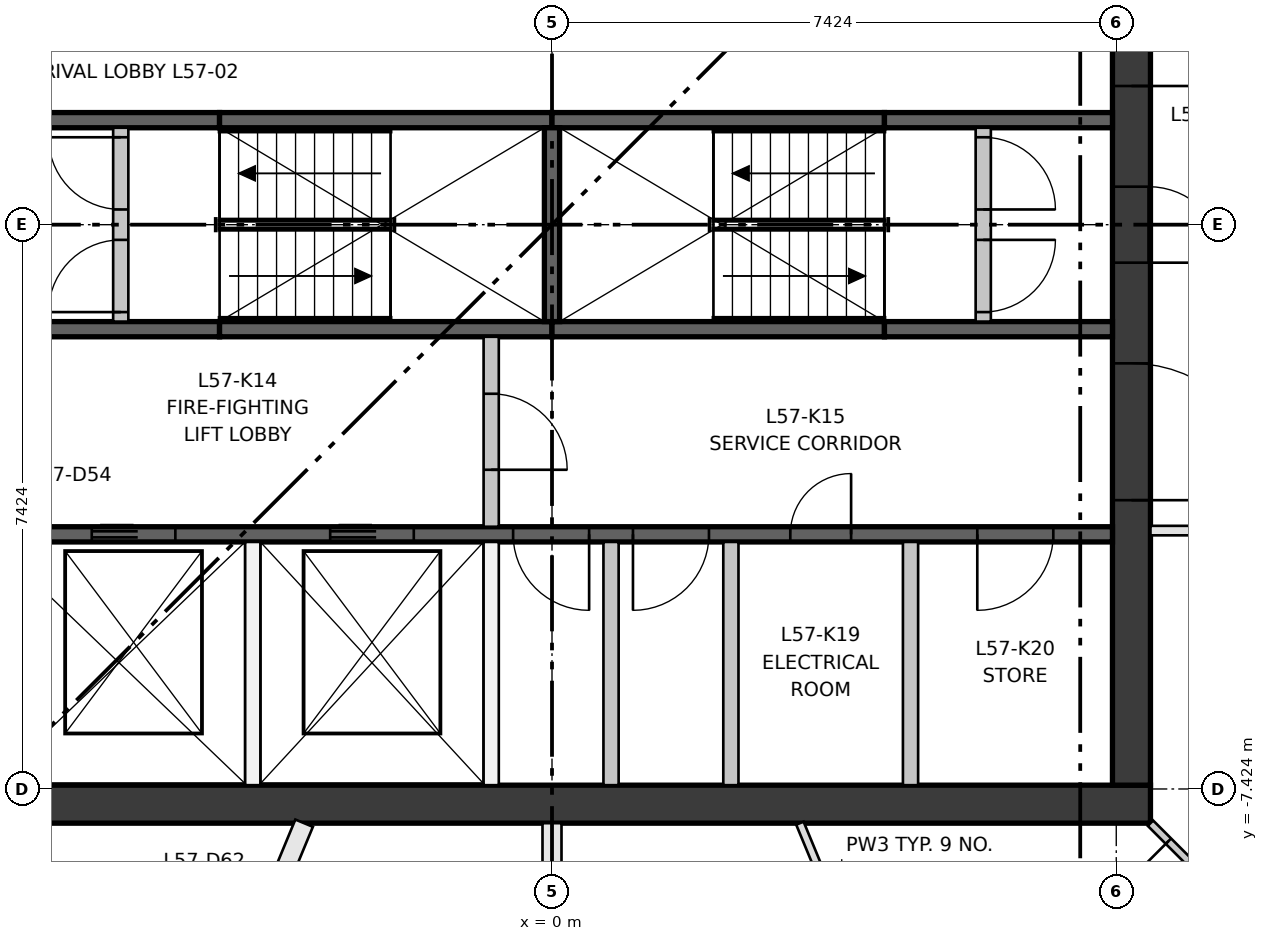
"""IFC4 building model, lengths in metres.
Left out: names, types, materials, properties, quantities, classifications, styles, units other than length and angle.
Written with IfcOpenShell. Run it as: python <this file> out.ifc"""

import sys

from ifc_helpers import new_model, si_unit, direction, frame, frame_2d, origin, place, context, subcontext, project, spatial, rectangle, extrude, element, fill, save


model = new_model("IFC4")
c1 = context("Model", 3, precision=1e-05, world=origin(), true_north=direction((0.0, 1.0)))
c2 = subcontext(c1, "Body", "Model", "MODEL_VIEW")
j1 = project(units=[si_unit("LENGTHUNIT", "METRE"), si_unit("PLANEANGLEUNIT", "RADIAN")], contexts=[c1])
p1 = place(None, origin())
s1 = spatial("IfcSite", under=j1, at=p1, CompositionType="ELEMENT")
p2 = place(p1, origin())
s2 = spatial("IfcBuilding", under=s1, at=p2, CompositionType="ELEMENT")
p3 = place(p2, frame((0.0, 0.0, 211.1)))
s3 = spatial("IfcBuildingStorey", under=s2, at=p3, CompositionType="ELEMENT", Elevation=211.1)
p4 = place(p3, frame((-7.874, -7.624, 0.0), z_axis=(0.0, 0.0, 1.0), x_axis=(1.0, 0.0, 0.0)))
e1 = element("IfcWall", 1, at=p4, inside=s3, PredefinedType="SHEAR", context=c2, shape_type="SweptSolid", body=[
    extrude(rectangle(XDim=15.748, YDim=0.5, at=frame_2d((7.874, 0.0))), origin(), (0.0, 0.0, 1.0), 3.35),
])
p5 = place(p3, frame((7.624, -7.374, 0.0), z_axis=(0.0, 0.0, 1.0), x_axis=(0.0, 1.0, 0.0)))
e2 = element("IfcWall", 2, at=p5, inside=s3, PredefinedType="SHEAR", context=c2, shape_type="SweptSolid", body=[
    extrude(rectangle(XDim=14.748, YDim=0.5, at=frame_2d((7.374, 0.0))), origin(), (0.0, 0.0, 1.0), 3.35),
])
p6 = place(p5, frame((6.874, 0.0, 0.0)))
e3 = element("IfcOpeningElement", 3, at=p6, cuts=e2, PredefinedType="OPENING", context=c2, shape_type="SweptSolid", body=[
    extrude(rectangle(XDim=1.0, YDim=2.1, at=frame_2d((0.5, 1.05))), frame((0.0, 0.26, 0.0), z_axis=(0.0, -1.0, 0.0), x_axis=(1.0, 0.0, 0.0)), (0.0, 0.0, 1.0), 0.52),
])
p7 = place(p5, frame((3.75, 0.0, 0.0)))
e4 = element("IfcOpeningElement", 4, at=p7, cuts=e2, PredefinedType="OPENING", context=c2, shape_type="SweptSolid", body=[
    extrude(rectangle(XDim=1.8, YDim=2.1, at=frame_2d((0.9, 1.05))), frame((0.0, 0.26, 0.0), z_axis=(0.0, -1.0, 0.0), x_axis=(1.0, 0.0, 0.0)), (0.0, 0.0, 1.0), 0.52),
])
p8 = place(p5, frame((9.198, 0.0, 0.0)))
e5 = element("IfcOpeningElement", 5, at=p8, cuts=e2, PredefinedType="OPENING", context=c2, shape_type="SweptSolid", body=[
    extrude(rectangle(XDim=1.8, YDim=2.1, at=frame_2d((0.9, 1.05))), frame((0.0, 0.26, 0.0), z_axis=(0.0, -1.0, 0.0), x_axis=(1.0, 0.0, 0.0)), (0.0, 0.0, 1.0), 0.52),
])
p9 = place(p3, frame((-7.374, -4.074, 0.0), z_axis=(0.0, 0.0, 1.0), x_axis=(1.0, 0.0, 0.0)))
e6 = element("IfcWall", 6, at=p9, inside=s3, PredefinedType="SHEAR", context=c2, shape_type="SweptSolid", body=[
    extrude(rectangle(XDim=14.748, YDim=0.2, at=frame_2d((7.374, 0.0))), origin(), (0.0, 0.0, 1.0), 3.0),
])
p10 = place(p9, frame((1.319, 0.0, 0.0)))
e7 = element("IfcOpeningElement", 7, at=p10, cuts=e6, PredefinedType="OPENING", context=c2, shape_type="SweptSolid", body=[
    extrude(rectangle(XDim=1.1, YDim=2.1, at=frame_2d((0.55, 1.05))), frame((0.0, 0.11, 0.0), z_axis=(0.0, -1.0, 0.0), x_axis=(1.0, 0.0, 0.0)), (0.0, 0.0, 1.0), 0.22),
])
p11 = place(p9, frame((4.456, 0.0, 0.0)))
e8 = element("IfcOpeningElement", 8, at=p11, cuts=e6, PredefinedType="OPENING", context=c2, shape_type="SweptSolid", body=[
    extrude(rectangle(XDim=1.1, YDim=2.1, at=frame_2d((0.55, 1.05))), frame((0.0, 0.11, 0.0), z_axis=(0.0, -1.0, 0.0), x_axis=(1.0, 0.0, 0.0)), (0.0, 0.0, 1.0), 0.22),
])
p12 = place(p9, frame((6.862, 0.0, 0.0)))
e9 = element("IfcOpeningElement", 9, at=p12, cuts=e6, PredefinedType="OPENING", context=c2, shape_type="SweptSolid", body=[
    extrude(rectangle(XDim=1.0, YDim=2.1, at=frame_2d((0.5, 1.05))), frame((0.0, 0.11, 0.0), z_axis=(0.0, -1.0, 0.0), x_axis=(1.0, 0.0, 0.0)), (0.0, 0.0, 1.0), 0.22),
])
p13 = place(p9, frame((8.439, 0.0, 0.0)))
e10 = element("IfcOpeningElement", 10, at=p13, cuts=e6, PredefinedType="OPENING", context=c2, shape_type="SweptSolid", body=[
    extrude(rectangle(XDim=1.0, YDim=2.1, at=frame_2d((0.5, 1.05))), frame((0.0, 0.11, 0.0), z_axis=(0.0, -1.0, 0.0), x_axis=(1.0, 0.0, 0.0)), (0.0, 0.0, 1.0), 0.22),
])
p14 = place(p9, frame((10.509, 0.0, 0.0)))
e11 = element("IfcOpeningElement", 11, at=p14, cuts=e6, PredefinedType="OPENING", context=c2, shape_type="SweptSolid", body=[
    extrude(rectangle(XDim=0.8, YDim=2.1, at=frame_2d((0.4, 1.05))), frame((0.0, 0.11, 0.0), z_axis=(0.0, -1.0, 0.0), x_axis=(1.0, 0.0, 0.0)), (0.0, 0.0, 1.0), 0.22),
])
p15 = place(p9, frame((12.969, 0.0, 0.0)))
e12 = element("IfcOpeningElement", 12, at=p15, cuts=e6, PredefinedType="OPENING", context=c2, shape_type="SweptSolid", body=[
    extrude(rectangle(XDim=1.0, YDim=2.1, at=frame_2d((0.5, 1.05))), frame((0.0, 0.11, 0.0), z_axis=(0.0, -1.0, 0.0), x_axis=(1.0, 0.0, 0.0)), (0.0, 0.0, 1.0), 0.22),
])
p16 = place(p3, frame((-7.374, -1.375, 0.0), z_axis=(0.0, 0.0, 1.0), x_axis=(1.0, 0.0, 0.0)))
e13 = element("IfcWall", 13, at=p16, inside=s3, PredefinedType="SHEAR", context=c2, shape_type="SweptSolid", body=[
    extrude(rectangle(XDim=3.0, YDim=0.2, at=frame_2d((1.5, 0.0))), origin(), (0.0, 0.0, 1.0), 3.0),
])
for number, where, z_axis, x_axis in (
    (14, (-4.374, -1.375, 0.0), (0.0, 0.0, 1.0), (1.0, 0.0, 0.0)),
    (15, (0.0, -1.375, 0.0), (0.0, 0.0, 1.0), (1.0, 0.0, 0.0)),
):
    element("IfcWall", number, at=place(p3, frame(where, z_axis=z_axis, x_axis=x_axis)), inside=s3, PredefinedType="SHEAR", context=c2, shape_type="SweptSolid", body=[
        extrude(rectangle(XDim=4.374, YDim=0.2, at=frame_2d((2.187, 0.0))), origin(), (0.0, 0.0, 1.0), 3.0),
    ])
for number, where, z_axis, x_axis in (
    (16, (4.374, -1.375, 0.0), (0.0, 0.0, 1.0), (1.0, 0.0, 0.0)),
    (17, (-7.374, 1.375, 0.0), (0.0, 0.0, 1.0), (1.0, 0.0, 0.0)),
):
    element("IfcWall", number, at=place(p3, frame(where, z_axis=z_axis, x_axis=x_axis)), inside=s3, PredefinedType="SHEAR", context=c2, shape_type="SweptSolid", body=[
        extrude(rectangle(XDim=3.0, YDim=0.2, at=frame_2d((1.5, 0.0))), origin(), (0.0, 0.0, 1.0), 3.0),
    ])
for number, where, z_axis, x_axis in (
    (18, (-4.374, 1.375, 0.0), (0.0, 0.0, 1.0), (1.0, 0.0, 0.0)),
    (19, (0.0, 1.375, 0.0), (0.0, 0.0, 1.0), (1.0, 0.0, 0.0)),
):
    element("IfcWall", number, at=place(p3, frame(where, z_axis=z_axis, x_axis=x_axis)), inside=s3, PredefinedType="SHEAR", context=c2, shape_type="SweptSolid", body=[
        extrude(rectangle(XDim=4.374, YDim=0.2, at=frame_2d((2.187, 0.0))), origin(), (0.0, 0.0, 1.0), 3.0),
    ])
p17 = place(p3, frame((4.374, 1.375, 0.0), z_axis=(0.0, 0.0, 1.0), x_axis=(1.0, 0.0, 0.0)))
e20 = element("IfcWall", 20, at=p17, inside=s3, PredefinedType="SHEAR", context=c2, shape_type="SweptSolid", body=[
    extrude(rectangle(XDim=3.0, YDim=0.2, at=frame_2d((1.5, 0.0))), origin(), (0.0, 0.0, 1.0), 3.0),
])
p18 = place(p3, frame((0.0, -1.275, 0.0), z_axis=(0.0, 0.0, 1.0), x_axis=(0.0, 1.0, 0.0)))
e21 = element("IfcWall", 21, at=p18, inside=s3, PredefinedType="SHEAR", context=c2, shape_type="SweptSolid", body=[
    extrude(rectangle(XDim=2.55, YDim=0.2, at=frame_2d((1.275, 0.0))), origin(), (0.0, 0.0, 1.0), 3.0),
])
for number, where, z_axis, x_axis in (
    (22, (-3.937, -7.374, 0.0), (0.0, 0.0, 1.0), (0.0, 1.0, 0.0)),
    (23, (-0.8, -7.374, 0.0), (0.0, 0.0, 1.0), (0.0, 1.0, 0.0)),
):
    element("IfcWall", number, at=place(p3, frame(where, z_axis=z_axis, x_axis=x_axis)), inside=s3, PredefinedType="PARTITIONING", context=c2, shape_type="SweptSolid", body=[
        extrude(rectangle(XDim=3.2, YDim=0.2, at=frame_2d((1.6, 0.0))), origin(), (0.0, 0.0, 1.0), 3.0),
    ])
p19 = place(p3, frame((-0.8, -3.974, 0.0), z_axis=(0.0, 0.0, 1.0), x_axis=(0.0, 1.0, 0.0)))
e24 = element("IfcWall", 24, at=p19, inside=s3, PredefinedType="PARTITIONING", context=c2, shape_type="SweptSolid", body=[
    extrude(rectangle(XDim=2.499, YDim=0.2, at=frame_2d((1.25, 0.0))), origin(), (0.0, 0.0, 1.0), 3.0),
])
p20 = place(p19, frame((0.75, 0.0, 0.0)))
e25 = element("IfcOpeningElement", 25, at=p20, cuts=e24, PredefinedType="OPENING", context=c2, shape_type="SweptSolid", body=[
    extrude(rectangle(XDim=1.0, YDim=2.1, at=frame_2d((0.5, 1.05))), frame((0.0, 0.11, 0.0), z_axis=(0.0, -1.0, 0.0), x_axis=(1.0, 0.0, 0.0)), (0.0, 0.0, 1.0), 0.22),
])
for number, where, z_axis, x_axis in (
    (26, (0.777, -7.374, 0.0), (0.0, 0.0, 1.0), (0.0, 1.0, 0.0)),
    (27, (2.354, -7.374, 0.0), (0.0, 0.0, 1.0), (0.0, 1.0, 0.0)),
    (28, (4.717, -7.374, 0.0), (0.0, 0.0, 1.0), (0.0, 1.0, 0.0)),
):
    element("IfcWall", number, at=place(p3, frame(where, z_axis=z_axis, x_axis=x_axis)), inside=s3, PredefinedType="PARTITIONING", context=c2, shape_type="SweptSolid", body=[
        extrude(rectangle(XDim=3.2, YDim=0.2, at=frame_2d((1.6, 0.0))), origin(), (0.0, 0.0, 1.0), 3.0),
    ])
p21 = place(p3, frame((-5.674, -1.275, 0.0), z_axis=(0.0, 0.0, 1.0), x_axis=(0.0, 1.0, 0.0)))
e29 = element("IfcWall", 29, at=p21, inside=s3, PredefinedType="PARTITIONING", context=c2, shape_type="SweptSolid", body=[
    extrude(rectangle(XDim=2.55, YDim=0.2, at=frame_2d((1.275, 0.0))), origin(), (0.0, 0.0, 1.0), 3.0),
])
p22 = place(p21, frame((0.125, 0.0, 0.0)))
e30 = element("IfcOpeningElement", 30, at=p22, cuts=e29, PredefinedType="OPENING", context=c2, shape_type="SweptSolid", body=[
    extrude(rectangle(XDim=0.95, YDim=2.1, at=frame_2d((0.475, 1.05))), frame((0.0, 0.11, 0.0), z_axis=(0.0, -1.0, 0.0), x_axis=(1.0, 0.0, 0.0)), (0.0, 0.0, 1.0), 0.22),
])
p23 = place(p21, frame((1.475, 0.0, 0.0)))
e31 = element("IfcOpeningElement", 31, at=p23, cuts=e29, PredefinedType="OPENING", context=c2, shape_type="SweptSolid", body=[
    extrude(rectangle(XDim=0.95, YDim=2.1, at=frame_2d((0.475, 1.05))), frame((0.0, 0.11, 0.0), z_axis=(0.0, -1.0, 0.0), x_axis=(1.0, 0.0, 0.0)), (0.0, 0.0, 1.0), 0.22),
])
p24 = place(p3, frame((5.674, -1.275, 0.0), z_axis=(0.0, 0.0, 1.0), x_axis=(0.0, 1.0, 0.0)))
e32 = element("IfcWall", 32, at=p24, inside=s3, PredefinedType="PARTITIONING", context=c2, shape_type="SweptSolid", body=[
    extrude(rectangle(XDim=2.55, YDim=0.2, at=frame_2d((1.275, 0.0))), origin(), (0.0, 0.0, 1.0), 3.0),
])
p25 = place(p24, frame((0.125, 0.0, 0.0)))
e33 = element("IfcOpeningElement", 33, at=p25, cuts=e32, PredefinedType="OPENING", context=c2, shape_type="SweptSolid", body=[
    extrude(rectangle(XDim=0.95, YDim=2.1, at=frame_2d((0.475, 1.05))), frame((0.0, 0.11, 0.0), z_axis=(0.0, -1.0, 0.0), x_axis=(1.0, 0.0, 0.0)), (0.0, 0.0, 1.0), 0.22),
])
p26 = place(p24, frame((1.475, 0.0, 0.0)))
e34 = element("IfcOpeningElement", 34, at=p26, cuts=e32, PredefinedType="OPENING", context=c2, shape_type="SweptSolid", body=[
    extrude(rectangle(XDim=0.95, YDim=2.1, at=frame_2d((0.475, 1.05))), frame((0.0, 0.11, 0.0), z_axis=(0.0, -1.0, 0.0), x_axis=(1.0, 0.0, 0.0)), (0.0, 0.0, 1.0), 0.22),
])
p27 = place(p3, frame((10.349, -4.024, 0.0), z_axis=(0.0, 0.0, 1.0), x_axis=(-1.0, 0.0, 0.0)))
e35 = element("IfcWall", 35, at=p27, inside=s3, PredefinedType="PARTITIONING", context=c2, shape_type="SweptSolid", body=[
    extrude(rectangle(XDim=2.475, YDim=0.125, at=frame_2d((1.238, 0.0))), origin(), (0.0, 0.0, 1.0), 3.0),
])
p28 = place(p27, frame((0.7, 0.0, 0.0)))
e36 = element("IfcOpeningElement", 36, at=p28, cuts=e35, PredefinedType="OPENING", context=c2, shape_type="SweptSolid", body=[
    extrude(rectangle(XDim=1.0, YDim=2.1, at=frame_2d((0.5, 1.05))), frame((0.0, 0.073, 0.0), z_axis=(0.0, -1.0, 0.0), x_axis=(1.0, 0.0, 0.0)), (0.0, 0.0, 1.0), 0.145),
])
p29 = place(p3, frame((-3.261, -7.874, 0.0), z_axis=(0.0, 0.0, 1.0), x_axis=(-0.382686527355, -0.923878250519, 0.0)))
e37 = element("IfcWall", 37, at=p29, inside=s3, PredefinedType="PARTITIONING", context=c2, shape_type="SweptSolid", body=[
    extrude(rectangle(XDim=2.877, YDim=0.25, at=frame_2d((1.438, 0.0))), origin(), (0.0, 0.0, 1.0), 3.0),
])
p30 = place(p29, frame((0.9, 0.0, 0.0)))
e38 = element("IfcOpeningElement", 38, at=p30, cuts=e37, PredefinedType="OPENING", context=c2, shape_type="SweptSolid", body=[
    extrude(rectangle(XDim=1.0, YDim=2.1, at=frame_2d((0.5, 1.05))), frame((0.0, 0.135, 0.0), z_axis=(0.0, -1.0, 0.0), x_axis=(1.0, 0.0, 0.0)), (0.0, 0.0, 1.0), 0.27),
])
p31 = place(p3, frame((0.0, -7.874, 0.0), z_axis=(0.0, 0.0, 1.0), x_axis=(0.0, -1.0, 0.0)))
e39 = element("IfcWall", 39, at=p31, inside=s3, PredefinedType="PARTITIONING", context=c2, shape_type="SweptSolid", body=[
    extrude(rectangle(XDim=3.526, YDim=0.25, at=frame_2d((1.763, 0.0))), origin(), (0.0, 0.0, 1.0), 3.0),
])
p32 = place(p3, frame((3.261, -7.874, 0.0), z_axis=(0.0, 0.0, 1.0), x_axis=(0.382686527355, -0.923878250519, 0.0)))
e40 = element("IfcWall", 40, at=p32, inside=s3, PredefinedType="PARTITIONING", context=c2, shape_type="SweptSolid", body=[
    extrude(rectangle(XDim=2.877, YDim=0.105, at=frame_2d((1.438, 0.0))), origin(), (0.0, 0.0, 1.0), 3.0),
])
p33 = place(p3, frame((10.939, -10.939, 0.0), z_axis=(0.0, 0.0, 1.0), x_axis=(-0.707106781187, 0.707106781187, 0.0)))
e41 = element("IfcWall", 41, at=p33, inside=s3, PredefinedType="PARTITIONING", context=c2, shape_type="SweptSolid", body=[
    extrude(rectangle(XDim=4.334, YDim=0.1, at=frame_2d((2.167, 0.0))), origin(), (0.0, 0.0, 1.0), 3.0),
])
p34 = place(p33, frame((3.0, 0.0, 0.0)))
e42 = element("IfcOpeningElement", 42, at=p34, cuts=e41, PredefinedType="OPENING", context=c2, shape_type="SweptSolid", body=[
    extrude(rectangle(XDim=1.0, YDim=2.1, at=frame_2d((0.5, 1.05))), frame((0.0, 0.06, 0.0), z_axis=(0.0, -1.0, 0.0), x_axis=(1.0, 0.0, 0.0)), (0.0, 0.0, 1.0), 0.12),
])
p35 = place(p10, origin())
e43 = element("IfcDoor", 43, at=p35, inside=s3, OperationType="DOUBLE_DOOR_SLIDING", PredefinedType="DOOR", context=c2, shape_type="SweptSolid", body=[
    extrude(rectangle(XDim=1.1, YDim=2.1, at=frame_2d((0.55, 1.05))), frame((0.0, 0.025, 0.0), z_axis=(0.0, -1.0, 0.0), x_axis=(1.0, 0.0, 0.0)), (0.0, 0.0, 1.0), 0.05),
])
fill(e7, e43)
p36 = place(p11, origin())
e44 = element("IfcDoor", 44, at=p36, inside=s3, OperationType="DOUBLE_DOOR_SLIDING", PredefinedType="DOOR", context=c2, shape_type="SweptSolid", body=[
    extrude(rectangle(XDim=1.1, YDim=2.1, at=frame_2d((0.55, 1.05))), frame((0.0, 0.025, 0.0), z_axis=(0.0, -1.0, 0.0), x_axis=(1.0, 0.0, 0.0)), (0.0, 0.0, 1.0), 0.05),
])
fill(e8, e44)
p37 = place(p22, origin())
e45 = element("IfcDoor", 45, at=p37, inside=s3, OperationType="SINGLE_SWING_LEFT", PredefinedType="DOOR", context=c2, shape_type="SweptSolid", body=[
    extrude(rectangle(XDim=0.95, YDim=2.1, at=frame_2d((0.475, 1.05))), frame((0.0, 0.025, 0.0), z_axis=(0.0, -1.0, 0.0), x_axis=(1.0, 0.0, 0.0)), (0.0, 0.0, 1.0), 0.05),
])
fill(e30, e45)
p38 = place(p23, origin())
e46 = element("IfcDoor", 46, at=p38, inside=s3, OperationType="SINGLE_SWING_RIGHT", PredefinedType="DOOR", context=c2, shape_type="SweptSolid", body=[
    extrude(rectangle(XDim=0.95, YDim=2.1, at=frame_2d((0.475, 1.05))), frame((0.0, 0.025, 0.0), z_axis=(0.0, -1.0, 0.0), x_axis=(1.0, 0.0, 0.0)), (0.0, 0.0, 1.0), 0.05),
])
fill(e31, e46)
p39 = place(p25, frame((0.95, 0.0, 0.0), z_axis=(0.0, 0.0, 1.0), x_axis=(-1.0, 0.0, 0.0)))
e47 = element("IfcDoor", 47, at=p39, inside=s3, OperationType="SINGLE_SWING_RIGHT", PredefinedType="DOOR", context=c2, shape_type="SweptSolid", body=[
    extrude(rectangle(XDim=0.95, YDim=2.1, at=frame_2d((0.475, 1.05))), frame((0.0, 0.025, 0.0), z_axis=(0.0, -1.0, 0.0), x_axis=(1.0, 0.0, 0.0)), (0.0, 0.0, 1.0), 0.05),
])
fill(e33, e47)
p40 = place(p26, frame((0.95, 0.0, 0.0), z_axis=(0.0, 0.0, 1.0), x_axis=(-1.0, 0.0, 0.0)))
e48 = element("IfcDoor", 48, at=p40, inside=s3, OperationType="SINGLE_SWING_LEFT", PredefinedType="DOOR", context=c2, shape_type="SweptSolid", body=[
    extrude(rectangle(XDim=0.95, YDim=2.1, at=frame_2d((0.475, 1.05))), frame((0.0, 0.025, 0.0), z_axis=(0.0, -1.0, 0.0), x_axis=(1.0, 0.0, 0.0)), (0.0, 0.0, 1.0), 0.05),
])
fill(e34, e48)
p41 = place(p20, frame((1.0, 0.0, 0.0), z_axis=(0.0, 0.0, 1.0), x_axis=(-1.0, 0.0, 0.0)))
e49 = element("IfcDoor", 49, at=p41, inside=s3, OperationType="SINGLE_SWING_LEFT", PredefinedType="DOOR", context=c2, shape_type="SweptSolid", body=[
    extrude(rectangle(XDim=1.0, YDim=2.1, at=frame_2d((0.5, 1.05))), frame((0.0, 0.025, 0.0), z_axis=(0.0, -1.0, 0.0), x_axis=(1.0, 0.0, 0.0)), (0.0, 0.0, 1.0), 0.05),
])
fill(e25, e49)
p42 = place(p12, frame((1.0, 0.0, 0.0), z_axis=(0.0, 0.0, 1.0), x_axis=(-1.0, 0.0, 0.0)))
e50 = element("IfcDoor", 50, at=p42, inside=s3, OperationType="SINGLE_SWING_RIGHT", PredefinedType="DOOR", context=c2, shape_type="SweptSolid", body=[
    extrude(rectangle(XDim=1.0, YDim=2.1, at=frame_2d((0.5, 1.05))), frame((0.0, 0.025, 0.0), z_axis=(0.0, -1.0, 0.0), x_axis=(1.0, 0.0, 0.0)), (0.0, 0.0, 1.0), 0.05),
])
fill(e9, e50)
p43 = place(p13, frame((1.0, 0.0, 0.0), z_axis=(0.0, 0.0, 1.0), x_axis=(-1.0, 0.0, 0.0)))
e51 = element("IfcDoor", 51, at=p43, inside=s3, OperationType="SINGLE_SWING_LEFT", PredefinedType="DOOR", context=c2, shape_type="SweptSolid", body=[
    extrude(rectangle(XDim=1.0, YDim=2.1, at=frame_2d((0.5, 1.05))), frame((0.0, 0.025, 0.0), z_axis=(0.0, -1.0, 0.0), x_axis=(1.0, 0.0, 0.0)), (0.0, 0.0, 1.0), 0.05),
])
fill(e10, e51)
p44 = place(p14, origin())
e52 = element("IfcDoor", 52, at=p44, inside=s3, OperationType="SINGLE_SWING_RIGHT", PredefinedType="DOOR", context=c2, shape_type="SweptSolid", body=[
    extrude(rectangle(XDim=0.8, YDim=2.1, at=frame_2d((0.4, 1.05))), frame((0.0, 0.025, 0.0), z_axis=(0.0, -1.0, 0.0), x_axis=(1.0, 0.0, 0.0)), (0.0, 0.0, 1.0), 0.05),
])
fill(e11, e52)
p45 = place(p15, frame((1.0, 0.0, 0.0), z_axis=(0.0, 0.0, 1.0), x_axis=(-1.0, 0.0, 0.0)))
e53 = element("IfcDoor", 53, at=p45, inside=s3, OperationType="SINGLE_SWING_LEFT", PredefinedType="DOOR", context=c2, shape_type="SweptSolid", body=[
    extrude(rectangle(XDim=1.0, YDim=2.1, at=frame_2d((0.5, 1.05))), frame((0.0, 0.025, 0.0), z_axis=(0.0, -1.0, 0.0), x_axis=(1.0, 0.0, 0.0)), (0.0, 0.0, 1.0), 0.05),
])
fill(e12, e53)
p46 = place(p6, frame((1.0, 0.0, 0.0), z_axis=(0.0, 0.0, 1.0), x_axis=(-1.0, 0.0, 0.0)))
e54 = element("IfcDoor", 54, at=p46, inside=s3, OperationType="SINGLE_SWING_LEFT", PredefinedType="DOOR", context=c2, shape_type="SweptSolid", body=[
    extrude(rectangle(XDim=1.0, YDim=2.1, at=frame_2d((0.5, 1.05))), frame((0.0, 0.25, 0.0), z_axis=(0.0, -1.0, 0.0), x_axis=(1.0, 0.0, 0.0)), (0.0, 0.0, 1.0), 0.05),
])
fill(e3, e54)
p47 = place(p7, frame((1.8, 0.0, 0.0), z_axis=(0.0, 0.0, 1.0), x_axis=(-1.0, 0.0, 0.0)))
e55 = element("IfcDoor", 55, at=p47, inside=s3, OperationType="DOUBLE_DOOR_SINGLE_SWING", PredefinedType="DOOR", context=c2, shape_type="SweptSolid", body=[
    extrude(rectangle(XDim=1.8, YDim=2.1, at=frame_2d((0.9, 1.05))), frame((0.0, 0.025, 0.0), z_axis=(0.0, -1.0, 0.0), x_axis=(1.0, 0.0, 0.0)), (0.0, 0.0, 1.0), 0.05),
])
fill(e4, e55)
p48 = place(p8, frame((1.8, 0.0, 0.0), z_axis=(0.0, 0.0, 1.0), x_axis=(-1.0, 0.0, 0.0)))
e56 = element("IfcDoor", 56, at=p48, inside=s3, OperationType="DOUBLE_DOOR_SINGLE_SWING", PredefinedType="DOOR", context=c2, shape_type="SweptSolid", body=[
    extrude(rectangle(XDim=1.8, YDim=2.1, at=frame_2d((0.9, 1.05))), frame((0.0, 0.025, 0.0), z_axis=(0.0, -1.0, 0.0), x_axis=(1.0, 0.0, 0.0)), (0.0, 0.0, 1.0), 0.05),
])
fill(e5, e56)
p49 = place(p34, origin())
e57 = element("IfcDoor", 57, at=p49, inside=s3, OperationType="SINGLE_SWING_RIGHT", PredefinedType="DOOR", context=c2, shape_type="SweptSolid", body=[
    extrude(rectangle(XDim=1.0, YDim=2.1, at=frame_2d((0.5, 1.05))), frame((0.0, 0.025, 0.0), z_axis=(0.0, -1.0, 0.0), x_axis=(1.0, 0.0, 0.0)), (0.0, 0.0, 1.0), 0.05),
])
fill(e42, e57)
save(model, sys.argv[1])
